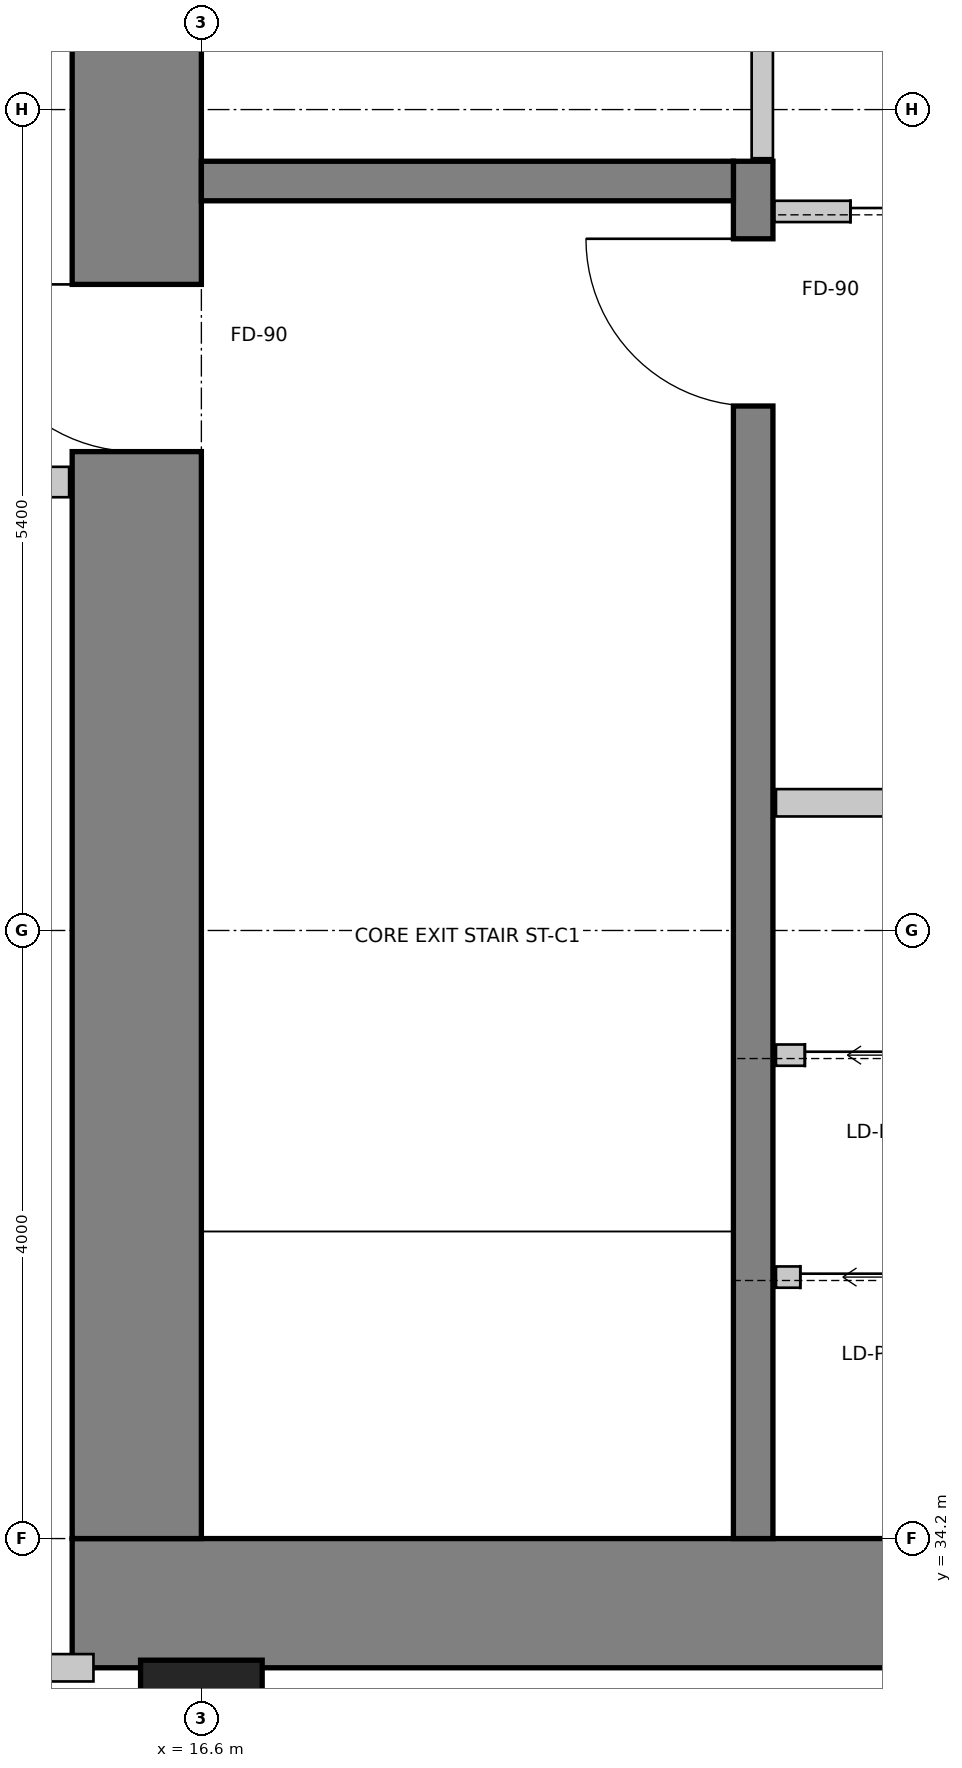
"""IFC4 building model, lengths in metres.
Left out: names, types, materials, properties, quantities, classifications, styles, units other than length and angle.
Written with IfcOpenShell. Run it as: python <this file> out.ifc"""

import sys

from ifc_helpers import new_model, si_unit, direction, frame, frame_2d, origin, origin_2d, place, context, subcontext, project, spatial, rectangle, extrude, source, transform, mapped, element, fill, save


model = new_model("IFC4")
c1 = context("Model", 3, precision=1e-05, world=origin(), true_north=direction((0.0, 1.0)))
c2 = subcontext(c1, "Body", "Model", "MODEL_VIEW")
j1 = project(units=[si_unit("LENGTHUNIT", "METRE"), si_unit("PLANEANGLEUNIT", "RADIAN")], contexts=[c1])
p1 = place(None, origin())
s1 = spatial("IfcSite", under=j1, at=p1, CompositionType="ELEMENT")
p2 = place(p1, origin())
s2 = spatial("IfcBuilding", under=s1, at=p2, CompositionType="ELEMENT")
p3 = place(p2, origin())
s3 = spatial("IfcBuildingStorey", under=s2, at=p3, CompositionType="ELEMENT", Elevation=0.0)
p4 = place(p3, frame((15.75, 33.775, 0.0), z_axis=(0.0, 0.0, 1.0), x_axis=(1.0, 0.0, 0.0)))
e1 = element("IfcWall", 1, at=p4, inside=s3, PredefinedType="SHEAR", context=c2, shape_type="SweptSolid", body=[
    extrude(rectangle(XDim=16.1, YDim=0.85, at=frame_2d((8.05, 0.0))), origin(), (0.0, 0.0, 1.0), 6.0),
])
m1 = source(origin(), c2, "Body", "SweptSolid", [
    extrude(rectangle(XDim=1.3, YDim=2.15, at=frame_2d((0.65, 1.075))), frame((0.0, 0.435, 0.0), z_axis=(0.0, -1.0, 0.0), x_axis=(1.0, 0.0, 0.0)), (0.0, 0.0, 1.0), 0.87),
])
p5 = place(p4, frame((10.18, 0.0, 0.0)))
e2 = element("IfcOpeningElement", 2, at=p5, cuts=e1, PredefinedType="OPENING", context=c2, shape_type="MappedRepresentation", body=[
    mapped(m1, transform((0.0, 0.0, 0.0), scale=1.0)),
])
p6 = place(p3, frame((16.175, 34.2, 0.0), z_axis=(0.0, 0.0, 1.0), x_axis=(0.0, 1.0, 0.0)))
e3 = element("IfcWall", 3, at=p6, inside=s3, PredefinedType="SHEAR", context=c2, shape_type="SweptSolid", body=[
    extrude(rectangle(XDim=11.4, YDim=0.85, at=frame_2d((5.7, 0.0))), origin(), (0.0, 0.0, 1.0), 6.0),
])
m2 = source(origin(), c2, "Body", "SweptSolid", [
    extrude(rectangle(XDim=1.1, YDim=2.15, at=frame_2d((0.55, 1.075))), frame((0.0, 0.435, 0.0), z_axis=(0.0, -1.0, 0.0), x_axis=(1.0, 0.0, 0.0)), (0.0, 0.0, 1.0), 0.87),
])
p7 = place(p6, frame((7.15, 0.0, 0.0)))
e4 = element("IfcOpeningElement", 4, at=p7, cuts=e3, PredefinedType="OPENING", context=c2, shape_type="MappedRepresentation", body=[
    mapped(m2, transform((0.0, 0.0, 0.0), scale=1.0)),
])
p8 = place(p3, frame((20.23, 34.2, 0.0), z_axis=(0.0, 0.0, 1.0), x_axis=(0.0, 1.0, 0.0)))
e5 = element("IfcWall", 5, at=p8, inside=s3, PredefinedType="SHEAR", context=c2, shape_type="SweptSolid", body=[
    extrude(rectangle(XDim=9.06, YDim=0.26, at=frame_2d((4.53, 0.0))), origin(), (0.0, 0.0, 1.0), 6.0),
])
m3 = source(origin(), c2, "Body", "SweptSolid", [
    extrude(rectangle(XDim=1.1, YDim=2.15, at=frame_2d((0.55, 1.075))), frame((0.0, 0.14, 0.0), z_axis=(0.0, -1.0, 0.0), x_axis=(1.0, 0.0, 0.0)), (0.0, 0.0, 1.0), 0.28),
])
p9 = place(p8, frame((7.45, 0.0, 0.0)))
e6 = element("IfcOpeningElement", 6, at=p9, cuts=e5, PredefinedType="OPENING", context=c2, shape_type="MappedRepresentation", body=[
    mapped(m3, transform((0.0, 0.0, 0.0), scale=1.0)),
])
p10 = place(p3, frame((16.6, 43.13, 0.0), z_axis=(0.0, 0.0, 1.0), x_axis=(1.0, 0.0, 0.0)))
e7 = element("IfcWall", 7, at=p10, inside=s3, PredefinedType="SHEAR", context=c2, shape_type="SweptSolid", body=[
    extrude(rectangle(XDim=3.5, YDim=0.26, at=frame_2d((1.75, 0.0))), origin(), (0.0, 0.0, 1.0), 6.0),
])
m4 = source(origin(), c2, "Body", "SweptSolid", [
    extrude(rectangle(XDim=1.4, YDim=1.4, at=origin_2d()), origin(), (0.0, 0.0, 1.0), 6.0),
])
p11 = place(p3, frame((16.6, 33.0, 0.0), z_axis=(0.0, 0.0, 1.0), x_axis=(1.0, 0.0, 0.0)))
e8 = element("IfcColumn", 8, at=p11, inside=s3, PredefinedType="COLUMN", context=c2, shape_type="MappedRepresentation", body=[
    mapped(m4, transform((0.0, 0.0, 0.0), scale=1.0)),
])
p12 = place(p3, frame((20.37, 42.93, 0.0), z_axis=(0.0, 0.0, 1.0), x_axis=(1.0, 0.0, 0.0)))
e9 = element("IfcWall", 9, at=p12, inside=s3, PredefinedType="SOLIDWALL", context=c2, shape_type="SweptSolid", body=[
    extrude(rectangle(XDim=6.86, YDim=0.14, at=frame_2d((3.43, 0.0))), origin(), (0.0, 0.0, 1.0), 5.7),
])
m5 = source(origin(), c2, "Body", "SweptSolid", [
    extrude(rectangle(XDim=1.1, YDim=2.15, at=frame_2d((0.55, 1.075))), frame((0.0, 0.08, 0.0), z_axis=(0.0, -1.0, 0.0), x_axis=(1.0, 0.0, 0.0)), (0.0, 0.0, 1.0), 0.16),
])
p13 = place(p12, frame((0.5, 0.0, 0.0)))
e10 = element("IfcOpeningElement", 10, at=p13, cuts=e9, PredefinedType="OPENING", context=c2, shape_type="MappedRepresentation", body=[
    mapped(m5, transform((0.0, 0.0, 0.0), scale=1.0)),
])
p14 = place(p12, frame((2.7, 0.0, 0.0)))
e11 = element("IfcOpeningElement", 11, at=p14, cuts=e9, PredefinedType="OPENING", context=c2, shape_type="MappedRepresentation", body=[
    mapped(m5, transform((0.0, 0.0, 0.0), scale=1.0)),
])
p15 = place(p12, frame((5.1, 0.0, 0.0)))
e12 = element("IfcOpeningElement", 12, at=p15, cuts=e9, PredefinedType="OPENING", context=c2, shape_type="MappedRepresentation", body=[
    mapped(m5, transform((0.0, 0.0, 0.0), scale=1.0)),
])
p16 = place(p3, frame((20.29, 43.28, 0.0), z_axis=(0.0, 0.0, 1.0), x_axis=(0.0, 1.0, 0.0)))
e13 = element("IfcWall", 13, at=p16, inside=s3, PredefinedType="SOLIDWALL", context=c2, shape_type="SweptSolid", body=[
    extrude(rectangle(XDim=2.3, YDim=0.14, at=frame_2d((1.15, 0.0))), origin(), (0.0, 0.0, 1.0), 5.7),
])
p17 = place(p3, frame((20.38, 35.92, 0.0), z_axis=(0.0, 0.0, 1.0), x_axis=(1.0, 0.0, 0.0)))
e14 = element("IfcWall", 14, at=p17, inside=s3, PredefinedType="SOLIDWALL", context=c2, shape_type="SweptSolid", body=[
    extrude(rectangle(XDim=5.65, YDim=0.14, at=frame_2d((2.825, 0.0))), origin(), (0.0, 0.0, 1.0), 5.7),
])
m6 = source(origin(), c2, "Body", "SweptSolid", [
    extrude(rectangle(XDim=1.0, YDim=2.15, at=frame_2d((0.5, 1.075))), frame((0.0, 0.08, 0.0), z_axis=(0.0, -1.0, 0.0), x_axis=(1.0, 0.0, 0.0)), (0.0, 0.0, 1.0), 0.16),
])
p18 = place(p17, frame((0.16, 0.0, 0.0)))
e15 = element("IfcOpeningElement", 15, at=p18, cuts=e14, PredefinedType="OPENING", context=c2, shape_type="MappedRepresentation", body=[
    mapped(m6, transform((0.0, 0.0, 0.0), scale=1.0)),
])
p19 = place(p17, frame((1.55, 0.0, 0.0)))
e16 = element("IfcOpeningElement", 16, at=p19, cuts=e14, PredefinedType="OPENING", context=c2, shape_type="MappedRepresentation", body=[
    mapped(m6, transform((0.0, 0.0, 0.0), scale=1.0)),
])
p20 = place(p17, frame((2.94, 0.0, 0.0)))
e17 = element("IfcOpeningElement", 17, at=p20, cuts=e14, PredefinedType="OPENING", context=c2, shape_type="MappedRepresentation", body=[
    mapped(m6, transform((0.0, 0.0, 0.0), scale=1.0)),
])
p21 = place(p17, frame((4.33, 0.0, 0.0)))
e18 = element("IfcOpeningElement", 18, at=p21, cuts=e14, PredefinedType="OPENING", context=c2, shape_type="MappedRepresentation", body=[
    mapped(m6, transform((0.0, 0.0, 0.0), scale=1.0)),
])
p22 = place(p3, frame((20.38, 37.38, 0.0), z_axis=(0.0, 0.0, 1.0), x_axis=(1.0, 0.0, 0.0)))
e19 = element("IfcWall", 19, at=p22, inside=s3, PredefinedType="SOLIDWALL", context=c2, shape_type="SweptSolid", body=[
    extrude(rectangle(XDim=5.75, YDim=0.14, at=frame_2d((2.875, 0.0))), origin(), (0.0, 0.0, 1.0), 5.7),
])
p23 = place(p22, frame((0.19, 0.0, 0.0)))
e20 = element("IfcOpeningElement", 20, at=p23, cuts=e19, PredefinedType="OPENING", context=c2, shape_type="MappedRepresentation", body=[
    mapped(m6, transform((0.0, 0.0, 0.0), scale=1.0)),
])
p24 = place(p22, frame((1.985, 0.0, 0.0)))
e21 = element("IfcOpeningElement", 21, at=p24, cuts=e19, PredefinedType="OPENING", context=c2, shape_type="MappedRepresentation", body=[
    mapped(m6, transform((0.0, 0.0, 0.0), scale=1.0)),
])
p25 = place(p22, frame((4.125, 0.0, 0.0)))
e22 = element("IfcOpeningElement", 22, at=p25, cuts=e19, PredefinedType="OPENING", context=c2, shape_type="MappedRepresentation", body=[
    mapped(m6, transform((0.0, 0.0, 0.0), scale=1.0)),
])
p26 = place(p3, frame((20.38, 39.04, 0.0), z_axis=(0.0, 0.0, 1.0), x_axis=(1.0, 0.0, 0.0)))
e23 = element("IfcWall", 23, at=p26, inside=s3, PredefinedType="SOLIDWALL", context=c2, shape_type="SweptSolid", body=[
    extrude(rectangle(XDim=5.75, YDim=0.18, at=frame_2d((2.875, 0.0))), origin(), (0.0, 0.0, 1.0), 5.7),
])
p27 = place(p3, frame((15.73, 41.15, 0.0), z_axis=(0.0, 0.0, 1.0), x_axis=(-1.0, 0.0, 0.0)))
e24 = element("IfcWall", 24, at=p27, inside=s3, PredefinedType="SOLIDWALL", context=c2, shape_type="SweptSolid", body=[
    extrude(rectangle(XDim=1.55, YDim=0.2, at=frame_2d((0.775, 0.0))), origin(), (0.0, 0.0, 1.0), 5.7),
])
p28 = place(p3, frame((11.44, 33.35, 0.0), z_axis=(0.0, 0.0, 1.0), x_axis=(1.0, 0.0, 0.0)))
e25 = element("IfcWall", 25, at=p28, inside=s3, PredefinedType="PARTITIONING", context=c2, shape_type="SweptSolid", body=[
    extrude(rectangle(XDim=4.45, YDim=0.18, at=frame_2d((2.225, 0.0))), origin(), (0.0, 0.0, 1.0), 4.492),
])
m7 = source(origin(), c2, "Body", "SweptSolid", [
    extrude(rectangle(XDim=1.4, YDim=2.15, at=frame_2d((0.7, 1.075))), frame((0.0, 0.1, 0.0), z_axis=(0.0, -1.0, 0.0), x_axis=(1.0, 0.0, 0.0)), (0.0, 0.0, 1.0), 0.2),
])
p29 = place(p28, frame((1.525, 0.0, 0.0)))
e26 = element("IfcOpeningElement", 26, at=p29, cuts=e25, PredefinedType="OPENING", context=c2, shape_type="MappedRepresentation", body=[
    mapped(m7, transform((0.0, 0.0, 0.0), scale=1.0)),
])
m8 = source(origin(), c2, "Body", "SweptSolid", [
    extrude(rectangle(XDim=1.1, YDim=2.15, at=frame_2d((0.55, 1.075))), frame((0.0, 0.025, 0.0), z_axis=(0.0, -1.0, 0.0), x_axis=(1.0, 0.0, 0.0)), (0.0, 0.0, 1.0), 0.05),
])
p30 = place(p13, origin())
e27 = element("IfcDoor", 27, at=p30, inside=s3, OperationType="SLIDING_TO_LEFT", PredefinedType="DOOR", context=c2, shape_type="MappedRepresentation", body=[
    mapped(m8, transform((0.0, 0.0, 0.0), scale=1.0)),
])
fill(e10, e27)
m9 = source(origin(), c2, "Body", "SweptSolid", [
    extrude(rectangle(XDim=1.0, YDim=2.15, at=frame_2d((0.5, 1.075))), frame((0.0, 0.025, 0.0), z_axis=(0.0, -1.0, 0.0), x_axis=(1.0, 0.0, 0.0)), (0.0, 0.0, 1.0), 0.05),
])
p31 = place(p18, origin())
e28 = element("IfcDoor", 28, at=p31, inside=s3, OperationType="SLIDING_TO_LEFT", PredefinedType="DOOR", context=c2, shape_type="MappedRepresentation", body=[
    mapped(m9, transform((0.0, 0.0, 0.0), scale=1.0)),
])
fill(e15, e28)
p32 = place(p23, origin())
e29 = element("IfcDoor", 29, at=p32, inside=s3, OperationType="SLIDING_TO_LEFT", PredefinedType="DOOR", context=c2, shape_type="MappedRepresentation", body=[
    mapped(m9, transform((0.0, 0.0, 0.0), scale=1.0)),
])
fill(e20, e29)
m10 = source(origin(), c2, "Body", "SweptSolid", [
    extrude(rectangle(XDim=1.1, YDim=2.15, at=frame_2d((0.55, 1.075))), frame((0.0, 0.025, 0.0), z_axis=(0.0, -1.0, 0.0), x_axis=(1.0, 0.0, 0.0)), (0.0, 0.0, 1.0), 0.05),
])
p33 = place(p9, origin())
e30 = element("IfcDoor", 30, at=p33, inside=s3, OperationType="SINGLE_SWING_RIGHT", PredefinedType="DOOR", context=c2, shape_type="MappedRepresentation", body=[
    mapped(m10, transform((0.0, 0.0, 0.0), scale=1.0)),
])
fill(e6, e30)
p34 = place(p7, origin())
e31 = element("IfcDoor", 31, at=p34, inside=s3, OperationType="SINGLE_SWING_RIGHT", PredefinedType="DOOR", context=c2, shape_type="MappedRepresentation", body=[
    mapped(m10, transform((0.0, 0.0, 0.0), scale=1.0)),
])
fill(e4, e31)
save(model, sys.argv[1])
